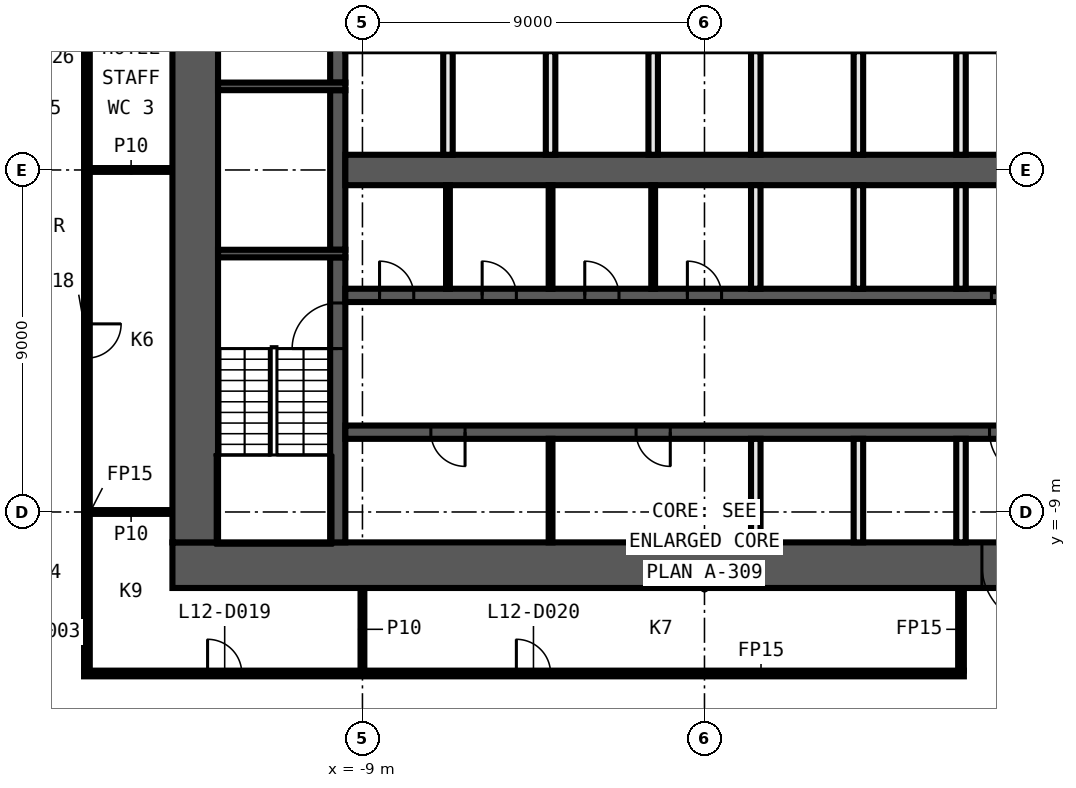
"""IFC4 building model, lengths in metres.
Left out: names, types, materials, properties, quantities, classifications, styles, units other than length and angle.
Written with IfcOpenShell. Run it as: python <this file> out.ifc"""

import sys

from ifc_helpers import new_model, si_unit, direction, frame, frame_2d, origin, place, context, subcontext, project, spatial, rectangle, extrude, element, fill, save


model = new_model("IFC4")
c1 = context("Model", 3, precision=1e-05, world=origin(), true_north=direction((0.0, 1.0)))
c2 = subcontext(c1, "Body", "Model", "MODEL_VIEW")
j1 = project(units=[si_unit("LENGTHUNIT", "METRE"), si_unit("PLANEANGLEUNIT", "RADIAN")], contexts=[c1])
p1 = place(None, origin())
s1 = spatial("IfcSite", under=j1, at=p1, CompositionType="ELEMENT")
p2 = place(p1, origin())
s2 = spatial("IfcBuilding", under=s1, at=p2, CompositionType="ELEMENT")
p3 = place(p2, frame((0.0, 0.0, 66.2)))
s3 = spatial("IfcBuildingStorey", under=s2, at=p3, CompositionType="ELEMENT", Elevation=66.2)
p4 = place(p3, frame((-16.325, -13.25, 0.0), z_axis=(0.0, 0.0, 1.0), x_axis=(1.0, 0.0, 0.0)))
e1 = element("IfcWall", 1, at=p4, inside=s3, PredefinedType="PARTITIONING", context=c2, shape_type="SweptSolid", body=[
    extrude(rectangle(XDim=23.15, YDim=0.15, at=frame_2d((11.575, 0.0))), origin(), (0.0, 0.0, 1.0), 3.3),
])
p5 = place(p4, frame((3.25, 0.0, 0.0)))
e2 = element("IfcOpeningElement", 2, at=p5, cuts=e1, PredefinedType="OPENING", context=c2, shape_type="SweptSolid", body=[
    extrude(rectangle(XDim=0.9, YDim=2.1, at=frame_2d((0.45, 1.05))), frame((0.0, 0.085, 0.0), z_axis=(0.0, -1.0, 0.0), x_axis=(1.0, 0.0, 0.0)), (0.0, 0.0, 1.0), 0.17),
])
p6 = place(p4, frame((11.375, 0.0, 0.0)))
e3 = element("IfcOpeningElement", 3, at=p6, cuts=e1, PredefinedType="OPENING", context=c2, shape_type="SweptSolid", body=[
    extrude(rectangle(XDim=0.9, YDim=2.1, at=frame_2d((0.45, 1.05))), frame((0.0, 0.085, 0.0), z_axis=(0.0, -1.0, 0.0), x_axis=(1.0, 0.0, 0.0)), (0.0, 0.0, 1.0), 0.17),
])
for number, where, z_axis, x_axis in (
    (4, (-16.175, -9.0, 0.0), (0.0, 0.0, 1.0), (1.0, 0.0, 0.0)),
    (5, (-16.175, 0.0, 0.0), (0.0, 0.0, 1.0), (1.0, 0.0, 0.0)),
):
    element("IfcWall", number, at=place(p3, frame(where, z_axis=z_axis, x_axis=x_axis)), inside=s3, PredefinedType="PARTITIONING", context=c2, shape_type="SweptSolid", body=[
        extrude(rectangle(XDim=2.175, YDim=0.1, at=frame_2d((1.087, 0.0))), origin(), (0.0, 0.0, 1.0), 3.3),
    ])
p7 = place(p3, frame((6.75, -13.175, 0.0), z_axis=(0.0, 0.0, 1.0), x_axis=(0.0, 1.0, 0.0)))
e6 = element("IfcWall", 6, at=p7, inside=s3, PredefinedType="PARTITIONING", context=c2, shape_type="SweptSolid", body=[
    extrude(rectangle(XDim=2.175, YDim=0.15, at=frame_2d((1.087, 0.0))), origin(), (0.0, 0.0, 1.0), 3.3),
])
p8 = place(p3, frame((-9.0, -13.175, 0.0), z_axis=(0.0, 0.0, 1.0), x_axis=(0.0, 1.0, 0.0)))
e7 = element("IfcWall", 7, at=p8, inside=s3, PredefinedType="PARTITIONING", context=c2, shape_type="SweptSolid", body=[
    extrude(rectangle(XDim=2.175, YDim=0.1, at=frame_2d((1.087, 0.0))), origin(), (0.0, 0.0, 1.0), 3.3),
])
p9 = place(p3, frame((-16.25, 13.175, 0.0), z_axis=(0.0, 0.0, 1.0), x_axis=(0.0, -1.0, 0.0)))
e8 = element("IfcWall", 8, at=p9, inside=s3, PredefinedType="PARTITIONING", context=c2, shape_type="SweptSolid", body=[
    extrude(rectangle(XDim=26.35, YDim=0.15, at=frame_2d((13.175, 0.0))), origin(), (0.0, 0.0, 1.0), 3.3),
])
p10 = place(p9, frame((17.225, 0.0, 0.0)))
e9 = element("IfcOpeningElement", 9, at=p10, cuts=e8, PredefinedType="OPENING", context=c2, shape_type="SweptSolid", body=[
    extrude(rectangle(XDim=0.9, YDim=2.1, at=frame_2d((0.45, 1.05))), frame((0.0, 0.085, 0.0), z_axis=(0.0, -1.0, 0.0), x_axis=(1.0, 0.0, 0.0)), (0.0, 0.0, 1.0), 0.17),
])
p11 = place(p9, frame((8.225, 0.0, 0.0)))
e10 = element("IfcOpeningElement", 10, at=p11, cuts=e8, PredefinedType="OPENING", context=c2, shape_type="SweptSolid", body=[
    extrude(rectangle(XDim=0.9, YDim=2.1, at=frame_2d((0.45, 1.05))), frame((0.0, 0.085, 0.0), z_axis=(0.0, -1.0, 0.0), x_axis=(1.0, 0.0, 0.0)), (0.0, 0.0, 1.0), 0.17),
])
p12 = place(p3, frame((14.0, -10.4, 0.0), z_axis=(0.0, 0.0, 1.0), x_axis=(-1.0, 0.0, 0.0)))
e11 = element("IfcWall", 11, at=p12, inside=s3, PredefinedType="SHEAR", context=c2, shape_type="SweptSolid", body=[
    extrude(rectangle(XDim=28.0, YDim=1.2, at=frame_2d((14.0, 0.0))), origin(), (0.0, 0.0, 1.0), 3.3),
])
p13 = place(p12, frame((5.1, 0.0, 0.0)))
e12 = element("IfcOpeningElement", 12, at=p13, cuts=e11, PredefinedType="OPENING", context=c2, shape_type="SweptSolid", body=[
    extrude(rectangle(XDim=1.6, YDim=2.1, at=frame_2d((0.8, 1.05))), frame((0.0, 0.61, 0.0), z_axis=(0.0, -1.0, 0.0), x_axis=(1.0, 0.0, 0.0)), (0.0, 0.0, 1.0), 1.22),
])
p14 = place(p3, frame((-13.4, -9.8, 0.0), z_axis=(0.0, 0.0, 1.0), x_axis=(0.0, 1.0, 0.0)))
e13 = element("IfcWall", 13, at=p14, inside=s3, PredefinedType="SHEAR", context=c2, shape_type="SweptSolid", body=[
    extrude(rectangle(XDim=19.6, YDim=1.2, at=frame_2d((9.8, 0.0))), origin(), (0.0, 0.0, 1.0), 3.3),
])
p15 = place(p3, frame((-9.65, -9.8, 0.0), z_axis=(0.0, 0.0, 1.0), x_axis=(0.0, 1.0, 0.0)))
e14 = element("IfcWall", 14, at=p15, inside=s3, PredefinedType="SHEAR", context=c2, shape_type="SweptSolid", body=[
    extrude(rectangle(XDim=7.5, YDim=0.4, at=frame_2d((3.75, 0.0))), origin(), (0.0, 0.0, 1.0), 3.3),
])
p16 = place(p15, frame((5.1, 0.0, 0.0)))
e15 = element("IfcOpeningElement", 15, at=p16, cuts=e14, PredefinedType="OPENING", context=c2, shape_type="SweptSolid", body=[
    extrude(rectangle(XDim=1.2, YDim=2.1, at=frame_2d((0.6, 1.05))), frame((0.0, 0.21, 0.0), z_axis=(0.0, -1.0, 0.0), x_axis=(1.0, 0.0, 0.0)), (0.0, 0.0, 1.0), 0.42),
])
p17 = place(p3, frame((-9.65, -2.1, 0.0), z_axis=(0.0, 0.0, 1.0), x_axis=(0.0, 1.0, 0.0)))
e16 = element("IfcWall", 16, at=p17, inside=s3, PredefinedType="SHEAR", context=c2, shape_type="SweptSolid", body=[
    extrude(rectangle(XDim=4.2, YDim=0.4, at=frame_2d((2.1, 0.0))), origin(), (0.0, 0.0, 1.0), 3.3),
])
p18 = place(p3, frame((-9.65, 2.3, 0.0), z_axis=(0.0, 0.0, 1.0), x_axis=(0.0, 1.0, 0.0)))
e17 = element("IfcWall", 17, at=p18, inside=s3, PredefinedType="SHEAR", context=c2, shape_type="SweptSolid", body=[
    extrude(rectangle(XDim=7.5, YDim=0.4, at=frame_2d((3.75, 0.0))), origin(), (0.0, 0.0, 1.0), 3.3),
])
p19 = place(p18, frame((1.2, 0.0, 0.0)))
e18 = element("IfcOpeningElement", 18, at=p19, cuts=e17, PredefinedType="OPENING", context=c2, shape_type="SweptSolid", body=[
    extrude(rectangle(XDim=1.2, YDim=2.1, at=frame_2d((0.6, 1.05))), frame((0.0, 0.21, 0.0), z_axis=(0.0, -1.0, 0.0), x_axis=(1.0, 0.0, 0.0)), (0.0, 0.0, 1.0), 0.42),
])
for number, where, z_axis, x_axis in (
    (19, (-9.45, 2.2, 0.0), (0.0, 0.0, 1.0), (-1.0, 0.0, 0.0)),
    (20, (-9.45, -2.2, 0.0), (0.0, 0.0, 1.0), (-1.0, 0.0, 0.0)),
):
    element("IfcWall", number, at=place(p3, frame(where, z_axis=z_axis, x_axis=x_axis)), inside=s3, PredefinedType="SHEAR", context=c2, shape_type="SweptSolid", body=[
        extrude(rectangle(XDim=3.35, YDim=0.2, at=frame_2d((1.675, 0.0))), origin(), (0.0, 0.0, 1.0), 3.3),
    ])
p20 = place(p3, frame((-9.45, -3.3, 0.0), z_axis=(0.0, 0.0, 1.0), x_axis=(1.0, 0.0, 0.0)))
e21 = element("IfcWall", 21, at=p20, inside=s3, PredefinedType="SHEAR", context=c2, shape_type="SweptSolid", body=[
    extrude(rectangle(XDim=18.9, YDim=0.35, at=frame_2d((9.45, 0.0))), origin(), (0.0, 0.0, 1.0), 3.3),
])
p21 = place(p20, frame((17.0, 0.0, 0.0)))
e22 = element("IfcOpeningElement", 22, at=p21, cuts=e21, PredefinedType="OPENING", context=c2, shape_type="SweptSolid", body=[
    extrude(rectangle(XDim=1.1, YDim=2.1, at=frame_2d((0.55, 1.05))), frame((0.0, 0.185, 0.0), z_axis=(0.0, -1.0, 0.0), x_axis=(1.0, 0.0, 0.0)), (0.0, 0.0, 1.0), 0.37),
])
p22 = place(p20, frame((0.9, 0.0, 0.0)))
e23 = element("IfcOpeningElement", 23, at=p22, cuts=e21, PredefinedType="OPENING", context=c2, shape_type="SweptSolid", body=[
    extrude(rectangle(XDim=0.9, YDim=2.1, at=frame_2d((0.45, 1.05))), frame((0.0, 0.185, 0.0), z_axis=(0.0, -1.0, 0.0), x_axis=(1.0, 0.0, 0.0)), (0.0, 0.0, 1.0), 0.37),
])
p23 = place(p20, frame((3.6, 0.0, 0.0)))
e24 = element("IfcOpeningElement", 24, at=p23, cuts=e21, PredefinedType="OPENING", context=c2, shape_type="SweptSolid", body=[
    extrude(rectangle(XDim=0.9, YDim=2.1, at=frame_2d((0.45, 1.05))), frame((0.0, 0.185, 0.0), z_axis=(0.0, -1.0, 0.0), x_axis=(1.0, 0.0, 0.0)), (0.0, 0.0, 1.0), 0.37),
])
p24 = place(p20, frame((6.3, 0.0, 0.0)))
e25 = element("IfcOpeningElement", 25, at=p24, cuts=e21, PredefinedType="OPENING", context=c2, shape_type="SweptSolid", body=[
    extrude(rectangle(XDim=0.9, YDim=2.1, at=frame_2d((0.45, 1.05))), frame((0.0, 0.185, 0.0), z_axis=(0.0, -1.0, 0.0), x_axis=(1.0, 0.0, 0.0)), (0.0, 0.0, 1.0), 0.37),
])
p25 = place(p20, frame((9.0, 0.0, 0.0)))
e26 = element("IfcOpeningElement", 26, at=p25, cuts=e21, PredefinedType="OPENING", context=c2, shape_type="SweptSolid", body=[
    extrude(rectangle(XDim=0.9, YDim=2.1, at=frame_2d((0.45, 1.05))), frame((0.0, 0.185, 0.0), z_axis=(0.0, -1.0, 0.0), x_axis=(1.0, 0.0, 0.0)), (0.0, 0.0, 1.0), 0.37),
])
p26 = place(p3, frame((9.45, -6.9, 0.0), z_axis=(0.0, 0.0, 1.0), x_axis=(-1.0, 0.0, 0.0)))
e27 = element("IfcWall", 27, at=p26, inside=s3, PredefinedType="SHEAR", context=c2, shape_type="SweptSolid", body=[
    extrude(rectangle(XDim=18.9, YDim=0.35, at=frame_2d((9.45, 0.0))), origin(), (0.0, 0.0, 1.0), 3.3),
])
p27 = place(p26, frame((0.75, 0.0, 0.0)))
e28 = element("IfcOpeningElement", 28, at=p27, cuts=e27, PredefinedType="OPENING", context=c2, shape_type="SweptSolid", body=[
    extrude(rectangle(XDim=1.2, YDim=2.1, at=frame_2d((0.6, 1.05))), frame((0.0, 0.185, 0.0), z_axis=(0.0, -1.0, 0.0), x_axis=(1.0, 0.0, 0.0)), (0.0, 0.0, 1.0), 0.37),
])
p28 = place(p26, frame((15.75, 0.0, 0.0)))
e29 = element("IfcOpeningElement", 29, at=p28, cuts=e27, PredefinedType="OPENING", context=c2, shape_type="SweptSolid", body=[
    extrude(rectangle(XDim=0.9, YDim=2.1, at=frame_2d((0.45, 1.05))), frame((0.0, 0.185, 0.0), z_axis=(0.0, -1.0, 0.0), x_axis=(1.0, 0.0, 0.0)), (0.0, 0.0, 1.0), 0.37),
])
p29 = place(p26, frame((10.35, 0.0, 0.0)))
e30 = element("IfcOpeningElement", 30, at=p29, cuts=e27, PredefinedType="OPENING", context=c2, shape_type="SweptSolid", body=[
    extrude(rectangle(XDim=0.9, YDim=2.1, at=frame_2d((0.45, 1.05))), frame((0.0, 0.185, 0.0), z_axis=(0.0, -1.0, 0.0), x_axis=(1.0, 0.0, 0.0)), (0.0, 0.0, 1.0), 0.37),
])
p30 = place(p3, frame((-9.45, 0.0, 0.0), z_axis=(0.0, 0.0, 1.0), x_axis=(1.0, 0.0, 0.0)))
e31 = element("IfcWall", 31, at=p30, inside=s3, PredefinedType="SHEAR", context=c2, shape_type="SweptSolid", body=[
    extrude(rectangle(XDim=18.9, YDim=0.8, at=frame_2d((9.45, 0.0))), origin(), (0.0, 0.0, 1.0), 3.3),
])
for number, where, z_axis, x_axis in (
    (32, (6.75, -9.8, 0.0), (0.0, 0.0, 1.0), (0.0, 1.0, 0.0)),
    (33, (6.75, -3.125, 0.0), (0.0, 0.0, 1.0), (0.0, 1.0, 0.0)),
    (34, (6.75, 0.4, 0.0), (0.0, 0.0, 1.0), (0.0, 1.0, 0.0)),
    (35, (4.05, -9.8, 0.0), (0.0, 0.0, 1.0), (0.0, 1.0, 0.0)),
    (36, (4.05, -3.125, 0.0), (0.0, 0.0, 1.0), (0.0, 1.0, 0.0)),
    (37, (4.05, 0.4, 0.0), (0.0, 0.0, 1.0), (0.0, 1.0, 0.0)),
    (38, (1.35, -9.8, 0.0), (0.0, 0.0, 1.0), (0.0, 1.0, 0.0)),
    (39, (1.35, -3.125, 0.0), (0.0, 0.0, 1.0), (0.0, 1.0, 0.0)),
    (40, (1.35, 0.4, 0.0), (0.0, 0.0, 1.0), (0.0, 1.0, 0.0)),
):
    element("IfcWall", number, at=place(p3, frame(where, z_axis=z_axis, x_axis=x_axis)), inside=s3, PredefinedType="SOLIDWALL", context=c2, shape_type="SweptSolid", body=[
        extrude(rectangle(XDim=2.725, YDim=0.25, at=frame_2d((1.363, 0.0))), origin(), (0.0, 0.0, 1.0), 3.3),
    ])
p31 = place(p3, frame((-1.35, -3.125, 0.0), z_axis=(0.0, 0.0, 1.0), x_axis=(0.0, 1.0, 0.0)))
e41 = element("IfcWall", 41, at=p31, inside=s3, PredefinedType="PARTITIONING", context=c2, shape_type="SweptSolid", body=[
    extrude(rectangle(XDim=2.725, YDim=0.1, at=frame_2d((1.363, 0.0))), origin(), (0.0, 0.0, 1.0), 3.3),
])
p32 = place(p3, frame((-1.35, 0.4, 0.0), z_axis=(0.0, 0.0, 1.0), x_axis=(0.0, 1.0, 0.0)))
e42 = element("IfcWall", 42, at=p32, inside=s3, PredefinedType="SOLIDWALL", context=c2, shape_type="SweptSolid", body=[
    extrude(rectangle(XDim=2.725, YDim=0.25, at=frame_2d((1.363, 0.0))), origin(), (0.0, 0.0, 1.0), 3.3),
])
for number, where, z_axis, x_axis in (
    (43, (-4.05, -9.8, 0.0), (0.0, 0.0, 1.0), (0.0, 1.0, 0.0)),
    (44, (-4.05, -3.125, 0.0), (0.0, 0.0, 1.0), (0.0, 1.0, 0.0)),
):
    element("IfcWall", number, at=place(p3, frame(where, z_axis=z_axis, x_axis=x_axis)), inside=s3, PredefinedType="PARTITIONING", context=c2, shape_type="SweptSolid", body=[
        extrude(rectangle(XDim=2.725, YDim=0.1, at=frame_2d((1.363, 0.0))), origin(), (0.0, 0.0, 1.0), 3.3),
    ])
p33 = place(p3, frame((-4.05, 0.4, 0.0), z_axis=(0.0, 0.0, 1.0), x_axis=(0.0, 1.0, 0.0)))
e45 = element("IfcWall", 45, at=p33, inside=s3, PredefinedType="SOLIDWALL", context=c2, shape_type="SweptSolid", body=[
    extrude(rectangle(XDim=2.725, YDim=0.25, at=frame_2d((1.363, 0.0))), origin(), (0.0, 0.0, 1.0), 3.3),
])
p34 = place(p3, frame((-6.75, -3.125, 0.0), z_axis=(0.0, 0.0, 1.0), x_axis=(0.0, 1.0, 0.0)))
e46 = element("IfcWall", 46, at=p34, inside=s3, PredefinedType="PARTITIONING", context=c2, shape_type="SweptSolid", body=[
    extrude(rectangle(XDim=2.725, YDim=0.1, at=frame_2d((1.363, 0.0))), origin(), (0.0, 0.0, 1.0), 3.3),
])
p35 = place(p3, frame((-6.75, 0.4, 0.0), z_axis=(0.0, 0.0, 1.0), x_axis=(0.0, 1.0, 0.0)))
e47 = element("IfcWall", 47, at=p35, inside=s3, PredefinedType="SOLIDWALL", context=c2, shape_type="SweptSolid", body=[
    extrude(rectangle(XDim=2.725, YDim=0.25, at=frame_2d((1.363, 0.0))), origin(), (0.0, 0.0, 1.0), 3.3),
])
p36 = place(p10, origin())
e48 = element("IfcDoor", 48, at=p36, inside=s3, OperationType="SINGLE_SWING_RIGHT", PredefinedType="DOOR", context=c2, shape_type="SweptSolid", body=[
    extrude(rectangle(XDim=0.9, YDim=2.1, at=frame_2d((0.45, 1.05))), frame((0.0, 0.025, 0.0), z_axis=(0.0, -1.0, 0.0), x_axis=(1.0, 0.0, 0.0)), (0.0, 0.0, 1.0), 0.05),
])
fill(e9, e48)
p37 = place(p5, origin())
e49 = element("IfcDoor", 49, at=p37, inside=s3, OperationType="SINGLE_SWING_LEFT", PredefinedType="DOOR", context=c2, shape_type="SweptSolid", body=[
    extrude(rectangle(XDim=0.9, YDim=2.1, at=frame_2d((0.45, 1.05))), frame((0.0, 0.025, 0.0), z_axis=(0.0, -1.0, 0.0), x_axis=(1.0, 0.0, 0.0)), (0.0, 0.0, 1.0), 0.05),
])
fill(e2, e49)
p38 = place(p6, origin())
e50 = element("IfcDoor", 50, at=p38, inside=s3, OperationType="SINGLE_SWING_RIGHT", PredefinedType="DOOR", context=c2, shape_type="SweptSolid", body=[
    extrude(rectangle(XDim=0.9, YDim=2.1, at=frame_2d((0.45, 1.05))), frame((0.0, 0.025, 0.0), z_axis=(0.0, -1.0, 0.0), x_axis=(1.0, 0.0, 0.0)), (0.0, 0.0, 1.0), 0.05),
])
fill(e3, e50)
p39 = place(p21, origin())
e51 = element("IfcDoor", 51, at=p39, inside=s3, OperationType="DOUBLE_DOOR_SLIDING", PredefinedType="DOOR", context=c2, shape_type="SweptSolid", body=[
    extrude(rectangle(XDim=1.1, YDim=2.1, at=frame_2d((0.55, 1.05))), frame((0.0, 0.025, 0.0), z_axis=(0.0, -1.0, 0.0), x_axis=(1.0, 0.0, 0.0)), (0.0, 0.0, 1.0), 0.05),
])
fill(e22, e51)
p40 = place(p13, origin())
e52 = element("IfcDoor", 52, at=p40, inside=s3, OperationType="DOUBLE_DOOR_SINGLE_SWING", PredefinedType="DOOR", context=c2, shape_type="SweptSolid", body=[
    extrude(rectangle(XDim=1.6, YDim=2.1, at=frame_2d((0.8, 1.05))), frame((0.0, 0.025, 0.0), z_axis=(0.0, -1.0, 0.0), x_axis=(1.0, 0.0, 0.0)), (0.0, 0.0, 1.0), 0.05),
])
fill(e12, e52)
p41 = place(p27, origin())
e53 = element("IfcDoor", 53, at=p41, inside=s3, OperationType="SINGLE_SWING_LEFT", PredefinedType="DOOR", context=c2, shape_type="SweptSolid", body=[
    extrude(rectangle(XDim=1.2, YDim=2.1, at=frame_2d((0.6, 1.05))), frame((0.0, 0.025, 0.0), z_axis=(0.0, -1.0, 0.0), x_axis=(1.0, 0.0, 0.0)), (0.0, 0.0, 1.0), 0.05),
])
fill(e28, e53)
p42 = place(p22, origin())
e54 = element("IfcDoor", 54, at=p42, inside=s3, OperationType="SINGLE_SWING_RIGHT", PredefinedType="DOOR", context=c2, shape_type="SweptSolid", body=[
    extrude(rectangle(XDim=0.9, YDim=2.1, at=frame_2d((0.45, 1.05))), frame((0.0, 0.025, 0.0), z_axis=(0.0, -1.0, 0.0), x_axis=(1.0, 0.0, 0.0)), (0.0, 0.0, 1.0), 0.05),
])
fill(e23, e54)
p43 = place(p23, origin())
e55 = element("IfcDoor", 55, at=p43, inside=s3, OperationType="SINGLE_SWING_LEFT", PredefinedType="DOOR", context=c2, shape_type="SweptSolid", body=[
    extrude(rectangle(XDim=0.9, YDim=2.1, at=frame_2d((0.45, 1.05))), frame((0.0, 0.025, 0.0), z_axis=(0.0, -1.0, 0.0), x_axis=(1.0, 0.0, 0.0)), (0.0, 0.0, 1.0), 0.05),
])
fill(e24, e55)
p44 = place(p24, origin())
e56 = element("IfcDoor", 56, at=p44, inside=s3, OperationType="SINGLE_SWING_RIGHT", PredefinedType="DOOR", context=c2, shape_type="SweptSolid", body=[
    extrude(rectangle(XDim=0.9, YDim=2.1, at=frame_2d((0.45, 1.05))), frame((0.0, 0.025, 0.0), z_axis=(0.0, -1.0, 0.0), x_axis=(1.0, 0.0, 0.0)), (0.0, 0.0, 1.0), 0.05),
])
fill(e25, e56)
p45 = place(p25, origin())
e57 = element("IfcDoor", 57, at=p45, inside=s3, OperationType="SINGLE_SWING_LEFT", PredefinedType="DOOR", context=c2, shape_type="SweptSolid", body=[
    extrude(rectangle(XDim=0.9, YDim=2.1, at=frame_2d((0.45, 1.05))), frame((0.0, 0.025, 0.0), z_axis=(0.0, -1.0, 0.0), x_axis=(1.0, 0.0, 0.0)), (0.0, 0.0, 1.0), 0.05),
])
fill(e26, e57)
p46 = place(p28, origin())
e58 = element("IfcDoor", 58, at=p46, inside=s3, OperationType="SINGLE_SWING_RIGHT", PredefinedType="DOOR", context=c2, shape_type="SweptSolid", body=[
    extrude(rectangle(XDim=0.9, YDim=2.1, at=frame_2d((0.45, 1.05))), frame((0.0, 0.025, 0.0), z_axis=(0.0, -1.0, 0.0), x_axis=(1.0, 0.0, 0.0)), (0.0, 0.0, 1.0), 0.05),
])
fill(e29, e58)
p47 = place(p29, origin())
e59 = element("IfcDoor", 59, at=p47, inside=s3, OperationType="SINGLE_SWING_LEFT", PredefinedType="DOOR", context=c2, shape_type="SweptSolid", body=[
    extrude(rectangle(XDim=0.9, YDim=2.1, at=frame_2d((0.45, 1.05))), frame((0.0, 0.025, 0.0), z_axis=(0.0, -1.0, 0.0), x_axis=(1.0, 0.0, 0.0)), (0.0, 0.0, 1.0), 0.05),
])
fill(e30, e59)
p48 = place(p16, origin())
e60 = element("IfcDoor", 60, at=p48, inside=s3, OperationType="SINGLE_SWING_LEFT", PredefinedType="DOOR", context=c2, shape_type="SweptSolid", body=[
    extrude(rectangle(XDim=1.2, YDim=2.1, at=frame_2d((0.6, 1.05))), frame((0.0, 0.025, 0.0), z_axis=(0.0, -1.0, 0.0), x_axis=(1.0, 0.0, 0.0)), (0.0, 0.0, 1.0), 0.05),
])
fill(e15, e60)
save(model, sys.argv[1])
